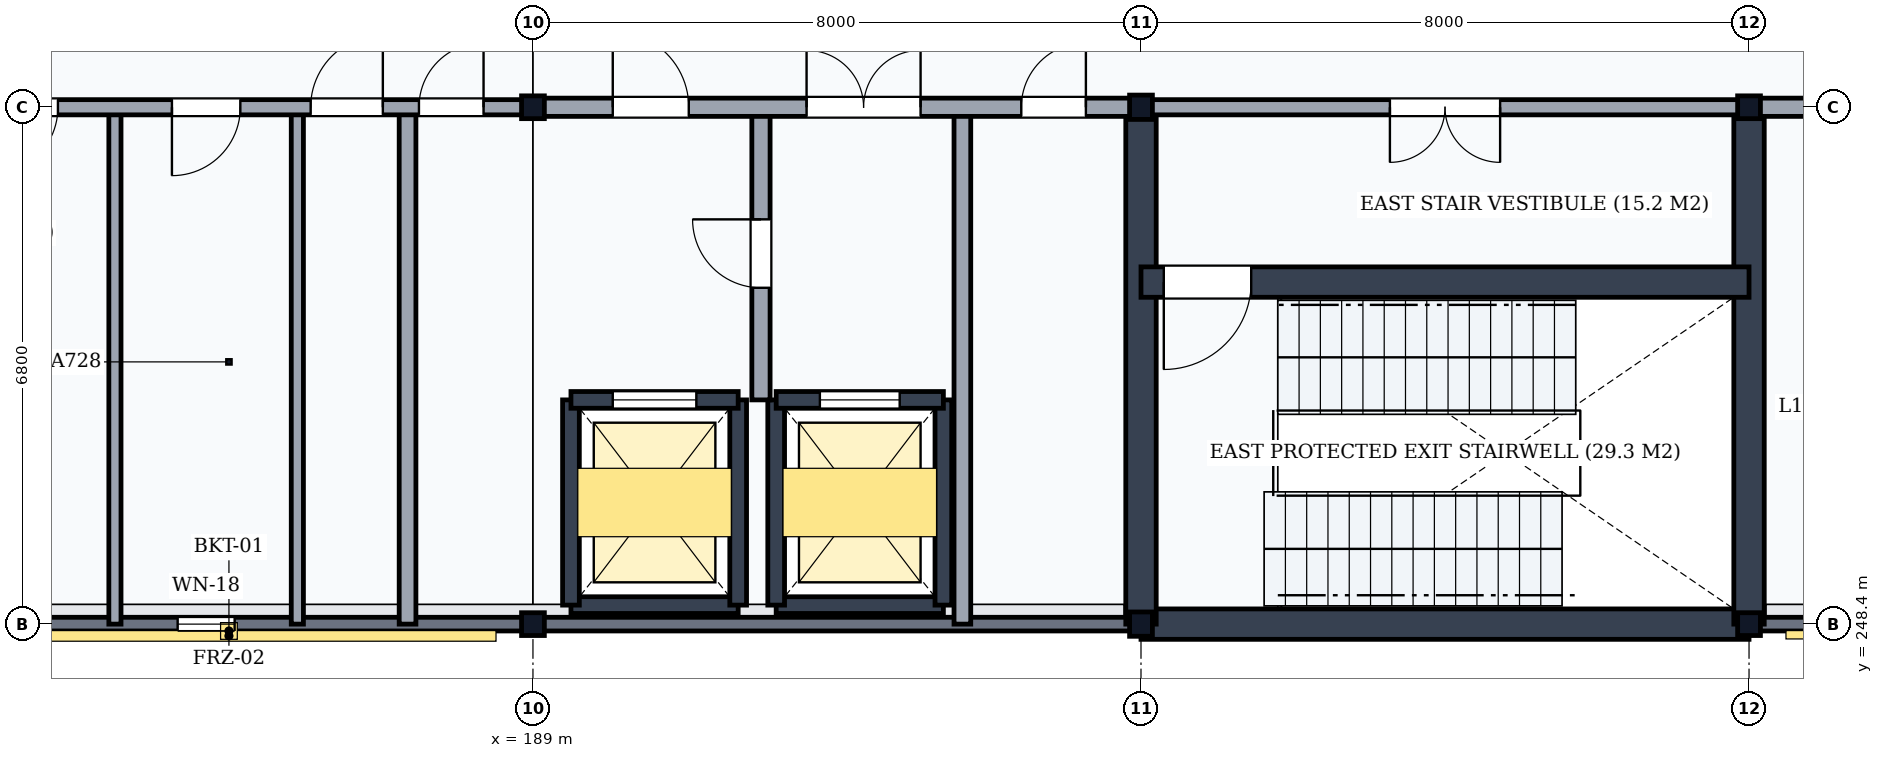
"""IFC4 building model, lengths in metres.
Left out: names, types, materials, properties, quantities, classifications, styles, units other than length and angle.
Written with IfcOpenShell. Run it as: python <this file> out.ifc"""

import sys

from ifc_helpers import new_model, si_unit, direction, frame, frame_2d, origin, origin_2d, place, context, subcontext, project, spatial, rectangle, i_section, extrude, element, fill, save


model = new_model("IFC4")
c1 = context("Model", 3, precision=1e-05, world=origin(), true_north=direction((0.0, 1.0)))
c2 = subcontext(c1, "Body", "Model", "MODEL_VIEW")
j1 = project(units=[si_unit("LENGTHUNIT", "METRE"), si_unit("PLANEANGLEUNIT", "RADIAN")], contexts=[c1])
p1 = place(None, origin())
s1 = spatial("IfcSite", under=j1, at=p1, CompositionType="ELEMENT")
p2 = place(p1, origin())
s2 = spatial("IfcBuilding", under=s1, at=p2, CompositionType="ELEMENT")
p3 = place(p2, frame((0.0, 0.0, 72.3)))
s3 = spatial("IfcBuildingStorey", under=s2, at=p3, CompositionType="ELEMENT", Elevation=72.3)
for number, where, z_axis, x_axis in (
    (1, (189.0, 248.4, 0.0), (0.0, 0.0, 1.0), (1.0, 0.0, 0.0)),
    (2, (189.0, 255.2, 0.0), (0.0, 0.0, 1.0), (1.0, 0.0, 0.0)),
):
    element("IfcColumn", number, at=place(p3, frame(where, z_axis=z_axis, x_axis=x_axis)), inside=s3, PredefinedType="COLUMN", context=c2, shape_type="SweptSolid", body=[
        extrude(i_section(OverallWidth=0.3, OverallDepth=0.3, WebThickness=0.011, FlangeThickness=0.019, FilletRadius=0.027, at=origin_2d()), origin(), (0.0, 0.0, 1.0), 5.4),
    ])
for number, where, z_axis, x_axis in (
    (3, (197.0, 248.4, 0.0), (0.0, 0.0, 1.0), (1.0, 0.0, 0.0)),
    (4, (197.0, 255.2, 0.0), (0.0, 0.0, 1.0), (1.0, 0.0, 0.0)),
):
    element("IfcColumn", number, at=place(p3, frame(where, z_axis=z_axis, x_axis=x_axis)), inside=s3, PredefinedType="COLUMN", context=c2, shape_type="SweptSolid", body=[
        extrude(i_section(OverallWidth=0.3, OverallDepth=0.32, WebThickness=0.011, FlangeThickness=0.021, FilletRadius=0.027, at=origin_2d()), origin(), (0.0, 0.0, 1.0), 5.4),
    ])
for number, where, z_axis, x_axis in (
    (5, (205.0, 248.4, 0.0), (0.0, 0.0, 1.0), (1.0, 0.0, 0.0)),
    (6, (205.0, 255.2, 0.0), (0.0, 0.0, 1.0), (1.0, 0.0, 0.0)),
):
    element("IfcColumn", number, at=place(p3, frame(where, z_axis=z_axis, x_axis=x_axis)), inside=s3, PredefinedType="COLUMN", context=c2, shape_type="SweptSolid", body=[
        extrude(i_section(OverallWidth=0.3, OverallDepth=0.3, WebThickness=0.011, FlangeThickness=0.019, FilletRadius=0.027, at=origin_2d()), origin(), (0.0, 0.0, 1.0), 5.4),
    ])
p4 = place(p3, frame((181.006, 248.4, 0.0), z_axis=(0.0, 0.0, 1.0), x_axis=(1.0, 0.0, 0.0)))
e7 = element("IfcWall", 7, at=p4, inside=s3, PredefinedType="SOLIDWALL", context=c2, shape_type="SweptSolid", body=[
    extrude(rectangle(XDim=7.988, YDim=0.18, at=frame_2d((3.994, 0.0))), origin(), (0.0, 0.0, 1.0), 4.838),
])
p5 = place(p4, frame((3.319, 0.0, 0.85)))
e8 = element("IfcOpeningElement", 8, at=p5, cuts=e7, PredefinedType="OPENING", context=c2, shape_type="SweptSolid", body=[
    extrude(rectangle(XDim=0.75, YDim=2.0, at=frame_2d((0.375, 1.0))), frame((0.0, 0.105, 0.0), z_axis=(0.0, -1.0, 0.0), x_axis=(1.0, 0.0, 0.0)), (0.0, 0.0, 1.0), 0.21),
])
p6 = place(p3, frame((189.006, 248.4, 0.0), z_axis=(0.0, 0.0, 1.0), x_axis=(1.0, 0.0, 0.0)))
e9 = element("IfcWall", 9, at=p6, inside=s3, PredefinedType="SOLIDWALL", context=c2, shape_type="SweptSolid", body=[
    extrude(rectangle(XDim=7.988, YDim=0.18, at=frame_2d((3.994, 0.0))), origin(), (0.0, 0.0, 1.0), 4.838),
])
p7 = place(p3, frame((205.006, 248.4, 0.0), z_axis=(0.0, 0.0, 1.0), x_axis=(1.0, 0.0, 0.0)))
e10 = element("IfcWall", 10, at=p7, inside=s3, PredefinedType="SOLIDWALL", context=c2, shape_type="SweptSolid", body=[
    extrude(rectangle(XDim=7.988, YDim=0.18, at=frame_2d((3.994, 0.0))), origin(), (0.0, 0.0, 1.0), 4.838),
])
p8 = place(p7, frame((3.244, 0.0, 0.95)))
e11 = element("IfcOpeningElement", 11, at=p8, cuts=e10, PredefinedType="OPENING", context=c2, shape_type="SweptSolid", body=[
    extrude(rectangle(XDim=1.5, YDim=1.9, at=frame_2d((0.75, 0.95))), frame((0.0, 0.105, 0.0), z_axis=(0.0, -1.0, 0.0), x_axis=(1.0, 0.0, 0.0)), (0.0, 0.0, 1.0), 0.21),
])
p9 = place(p3, frame((173.22, 248.53, 5.4), z_axis=(0.0, 0.0, 1.0), x_axis=(1.0, 0.0, 0.0)))
e12 = element("IfcWall", 12, at=p9, inside=s3, PredefinedType="PARAPET", context=c2, shape_type="SweptSolid", body=[
    extrude(rectangle(XDim=23.56, YDim=0.26, at=frame_2d((11.78, 0.0))), origin(), (0.0, 0.0, 1.0), 1.5),
])
p10 = place(p3, frame((205.22, 248.53, 5.4), z_axis=(0.0, 0.0, 1.0), x_axis=(1.0, 0.0, 0.0)))
e13 = element("IfcWall", 13, at=p10, inside=s3, PredefinedType="PARAPET", context=c2, shape_type="SweptSolid", body=[
    extrude(rectangle(XDim=7.78, YDim=0.26, at=frame_2d((3.89, 0.0))), origin(), (0.0, 0.0, 1.0), 1.5),
])
p11 = place(p3, frame((197.0, 248.4, 0.0), z_axis=(0.0, 0.0, 1.0), x_axis=(1.0, 0.0, 0.0)))
e14 = element("IfcWall", 14, at=p11, inside=s3, PredefinedType="SHEAR", context=c2, shape_type="SweptSolid", body=[
    extrude(rectangle(XDim=8.0, YDim=0.4, at=frame_2d((4.0, 0.0))), origin(), (0.0, 0.0, 1.0), 5.15),
])
for number, where, z_axis, x_axis in (
    (15, (197.0, 248.4, 0.0), (0.0, 0.0, 1.0), (0.0, 1.0, 0.0)),
    (16, (205.0, 248.4, 0.0), (0.0, 0.0, 1.0), (0.0, 1.0, 0.0)),
):
    element("IfcWall", number, at=place(p3, frame(where, z_axis=z_axis, x_axis=x_axis)), inside=s3, PredefinedType="SHEAR", context=c2, shape_type="SweptSolid", body=[
        extrude(rectangle(XDim=6.8, YDim=0.4, at=frame_2d((3.4, 0.0))), origin(), (0.0, 0.0, 1.0), 5.15),
    ])
p12 = place(p3, frame((197.0, 252.9, 0.0), z_axis=(0.0, 0.0, 1.0), x_axis=(1.0, 0.0, 0.0)))
e17 = element("IfcWall", 17, at=p12, inside=s3, PredefinedType="SHEAR", context=c2, shape_type="SweptSolid", body=[
    extrude(rectangle(XDim=8.0, YDim=0.4, at=frame_2d((4.0, 0.0))), origin(), (0.0, 0.0, 1.0), 5.15),
])
p13 = place(p12, frame((0.3, 0.0, 0.0)))
e18 = element("IfcOpeningElement", 18, at=p13, cuts=e17, PredefinedType="OPENING", context=c2, shape_type="SweptSolid", body=[
    extrude(rectangle(XDim=1.15, YDim=2.15, at=frame_2d((0.575, 1.075))), frame((0.0, 0.215, 0.0), z_axis=(0.0, -1.0, 0.0), x_axis=(1.0, 0.0, 0.0)), (0.0, 0.0, 1.0), 0.43),
])
p14 = place(p3, frame((197.0, 255.2, 0.0), z_axis=(0.0, 0.0, 1.0), x_axis=(1.0, 0.0, 0.0)))
e19 = element("IfcWall", 19, at=p14, inside=s3, PredefinedType="PARTITIONING", context=c2, shape_type="SweptSolid", body=[
    extrude(rectangle(XDim=8.0, YDim=0.2, at=frame_2d((4.0, 0.0))), origin(), (0.0, 0.0, 1.0), 4.648),
])
p15 = place(p14, frame((3.275, 0.0, 0.0)))
e20 = element("IfcOpeningElement", 20, at=p15, cuts=e19, PredefinedType="OPENING", context=c2, shape_type="SweptSolid", body=[
    extrude(rectangle(XDim=1.45, YDim=2.2, at=frame_2d((0.725, 1.1))), frame((0.0, 0.115, 0.0), z_axis=(0.0, -1.0, 0.0), x_axis=(1.0, 0.0, 0.0)), (0.0, 0.0, 1.0), 0.23),
])
p16 = place(p3, frame((189.5, 248.65, 0.0), z_axis=(0.0, 0.0, 1.0), x_axis=(1.0, 0.0, 0.0)))
e21 = element("IfcWall", 21, at=p16, inside=s3, PredefinedType="SHEAR", context=c2, shape_type="SweptSolid", body=[
    extrude(rectangle(XDim=2.2, YDim=0.22, at=frame_2d((1.1, 0.0))), origin(), (0.0, 0.0, 1.0), 5.15),
])
for number, where, z_axis, x_axis in (
    (22, (189.5, 248.65, 0.0), (0.0, 0.0, 1.0), (0.0, 1.0, 0.0)),
    (23, (191.7, 248.65, 0.0), (0.0, 0.0, 1.0), (0.0, 1.0, 0.0)),
):
    element("IfcWall", number, at=place(p3, frame(where, z_axis=z_axis, x_axis=x_axis)), inside=s3, PredefinedType="SHEAR", context=c2, shape_type="SweptSolid", body=[
        extrude(rectangle(XDim=2.7, YDim=0.22, at=frame_2d((1.35, 0.0))), origin(), (0.0, 0.0, 1.0), 5.15),
    ])
p17 = place(p3, frame((189.5, 251.35, 0.0), z_axis=(0.0, 0.0, 1.0), x_axis=(1.0, 0.0, 0.0)))
e24 = element("IfcWall", 24, at=p17, inside=s3, PredefinedType="SHEAR", context=c2, shape_type="SweptSolid", body=[
    extrude(rectangle(XDim=2.2, YDim=0.22, at=frame_2d((1.1, 0.0))), origin(), (0.0, 0.0, 1.0), 5.15),
])
p18 = place(p17, frame((0.55, 0.0, 0.0)))
e25 = element("IfcOpeningElement", 25, at=p18, cuts=e24, PredefinedType="OPENING", context=c2, shape_type="SweptSolid", body=[
    extrude(rectangle(XDim=1.1, YDim=2.15, at=frame_2d((0.55, 1.075))), frame((0.0, 0.125, 0.0), z_axis=(0.0, -1.0, 0.0), x_axis=(1.0, 0.0, 0.0)), (0.0, 0.0, 1.0), 0.25),
])
p19 = place(p3, frame((192.2, 248.65, 0.0), z_axis=(0.0, 0.0, 1.0), x_axis=(1.0, 0.0, 0.0)))
e26 = element("IfcWall", 26, at=p19, inside=s3, PredefinedType="SHEAR", context=c2, shape_type="SweptSolid", body=[
    extrude(rectangle(XDim=2.2, YDim=0.22, at=frame_2d((1.1, 0.0))), origin(), (0.0, 0.0, 1.0), 5.15),
])
for number, where, z_axis, x_axis in (
    (27, (192.2, 248.65, 0.0), (0.0, 0.0, 1.0), (0.0, 1.0, 0.0)),
    (28, (194.4, 248.65, 0.0), (0.0, 0.0, 1.0), (0.0, 1.0, 0.0)),
):
    element("IfcWall", number, at=place(p3, frame(where, z_axis=z_axis, x_axis=x_axis)), inside=s3, PredefinedType="SHEAR", context=c2, shape_type="SweptSolid", body=[
        extrude(rectangle(XDim=2.7, YDim=0.22, at=frame_2d((1.35, 0.0))), origin(), (0.0, 0.0, 1.0), 5.15),
    ])
p20 = place(p3, frame((192.2, 251.35, 0.0), z_axis=(0.0, 0.0, 1.0), x_axis=(1.0, 0.0, 0.0)))
e29 = element("IfcWall", 29, at=p20, inside=s3, PredefinedType="SHEAR", context=c2, shape_type="SweptSolid", body=[
    extrude(rectangle(XDim=2.2, YDim=0.22, at=frame_2d((1.1, 0.0))), origin(), (0.0, 0.0, 1.0), 5.15),
])
p21 = place(p20, frame((0.575, 0.0, 0.0)))
e30 = element("IfcOpeningElement", 30, at=p21, cuts=e29, PredefinedType="OPENING", context=c2, shape_type="SweptSolid", body=[
    extrude(rectangle(XDim=1.05, YDim=2.15, at=frame_2d((0.525, 1.075))), frame((0.0, 0.125, 0.0), z_axis=(0.0, -1.0, 0.0), x_axis=(1.0, 0.0, 0.0)), (0.0, 0.0, 1.0), 0.25),
])
p22 = place(p3, frame((192.0, 251.35, 0.0), z_axis=(0.0, 0.0, 1.0), x_axis=(0.0, 1.0, 0.0)))
e31 = element("IfcWall", 31, at=p22, inside=s3, PredefinedType="PARTITIONING", context=c2, shape_type="SweptSolid", body=[
    extrude(rectangle(XDim=3.85, YDim=0.24, at=frame_2d((1.925, 0.0))), origin(), (0.0, 0.0, 1.0), 5.15),
])
p23 = place(p22, frame((1.475, 0.0, 0.0)))
e32 = element("IfcOpeningElement", 32, at=p23, cuts=e31, PredefinedType="OPENING", context=c2, shape_type="SweptSolid", body=[
    extrude(rectangle(XDim=0.9, YDim=2.1, at=frame_2d((0.45, 1.05))), frame((0.0, 0.135, 0.0), z_axis=(0.0, -1.0, 0.0), x_axis=(1.0, 0.0, 0.0)), (0.0, 0.0, 1.0), 0.27),
])
p24 = place(p3, frame((194.65, 248.4, 0.0), z_axis=(0.0, 0.0, 1.0), x_axis=(0.0, 1.0, 0.0)))
e33 = element("IfcWall", 33, at=p24, inside=s3, PredefinedType="PARTITIONING", context=c2, shape_type="SweptSolid", body=[
    extrude(rectangle(XDim=6.8, YDim=0.22, at=frame_2d((3.4, 0.0))), origin(), (0.0, 0.0, 1.0), 5.15),
])
for number, where, z_axis, x_axis in (
    (34, (183.5, 248.4, 0.0), (0.0, 0.0, 1.0), (0.0, 1.0, 0.0)),
    (35, (185.9, 248.4, 0.0), (0.0, 0.0, 1.0), (0.0, 1.0, 0.0)),
):
    element("IfcWall", number, at=place(p3, frame(where, z_axis=z_axis, x_axis=x_axis)), inside=s3, PredefinedType="PARTITIONING", context=c2, shape_type="SweptSolid", body=[
        extrude(rectangle(XDim=6.8, YDim=0.16, at=frame_2d((3.4, 0.0))), origin(), (0.0, 0.0, 1.0), 5.15),
    ])
p25 = place(p3, frame((187.35, 248.4, 0.0), z_axis=(0.0, 0.0, 1.0), x_axis=(0.0, 1.0, 0.0)))
e36 = element("IfcWall", 36, at=p25, inside=s3, PredefinedType="PARTITIONING", context=c2, shape_type="SweptSolid", body=[
    extrude(rectangle(XDim=6.8, YDim=0.22, at=frame_2d((3.4, 0.0))), origin(), (0.0, 0.0, 1.0), 5.15),
])
p26 = place(p3, frame((181.0, 255.2, 0.0), z_axis=(0.0, 0.0, 1.0), x_axis=(1.0, 0.0, 0.0)))
e37 = element("IfcWall", 37, at=p26, inside=s3, PredefinedType="PARTITIONING", context=c2, shape_type="SweptSolid", body=[
    extrude(rectangle(XDim=8.0, YDim=0.2, at=frame_2d((4.0, 0.0))), origin(), (0.0, 0.0, 1.0), 4.648),
])
p27 = place(p26, frame((0.85, 0.0, 0.0)))
e38 = element("IfcOpeningElement", 38, at=p27, cuts=e37, PredefinedType="OPENING", context=c2, shape_type="SweptSolid", body=[
    extrude(rectangle(XDim=0.9, YDim=2.1, at=frame_2d((0.45, 1.05))), frame((0.0, 0.115, 0.0), z_axis=(0.0, -1.0, 0.0), x_axis=(1.0, 0.0, 0.0)), (0.0, 0.0, 1.0), 0.23),
])
p28 = place(p26, frame((3.25, 0.0, 0.0)))
e39 = element("IfcOpeningElement", 39, at=p28, cuts=e37, PredefinedType="OPENING", context=c2, shape_type="SweptSolid", body=[
    extrude(rectangle(XDim=0.9, YDim=2.1, at=frame_2d((0.45, 1.05))), frame((0.0, 0.115, 0.0), z_axis=(0.0, -1.0, 0.0), x_axis=(1.0, 0.0, 0.0)), (0.0, 0.0, 1.0), 0.23),
])
p29 = place(p26, frame((5.075, 0.0, 0.0)))
e40 = element("IfcOpeningElement", 40, at=p29, cuts=e37, PredefinedType="OPENING", context=c2, shape_type="SweptSolid", body=[
    extrude(rectangle(XDim=0.95, YDim=2.1, at=frame_2d((0.475, 1.05))), frame((0.0, 0.115, 0.0), z_axis=(0.0, -1.0, 0.0), x_axis=(1.0, 0.0, 0.0)), (0.0, 0.0, 1.0), 0.23),
])
p30 = place(p26, frame((6.5, 0.0, 0.0)))
e41 = element("IfcOpeningElement", 41, at=p30, cuts=e37, PredefinedType="OPENING", context=c2, shape_type="SweptSolid", body=[
    extrude(rectangle(XDim=0.85, YDim=2.1, at=frame_2d((0.425, 1.05))), frame((0.0, 0.115, 0.0), z_axis=(0.0, -1.0, 0.0), x_axis=(1.0, 0.0, 0.0)), (0.0, 0.0, 1.0), 0.23),
])
p31 = place(p3, frame((189.0, 255.2, 0.0), z_axis=(0.0, 0.0, 1.0), x_axis=(1.0, 0.0, 0.0)))
e42 = element("IfcWall", 42, at=p31, inside=s3, PredefinedType="PARTITIONING", context=c2, shape_type="SweptSolid", body=[
    extrude(rectangle(XDim=8.0, YDim=0.24, at=frame_2d((4.0, 0.0))), origin(), (0.0, 0.0, 1.0), 4.648),
])
p32 = place(p31, frame((1.05, 0.0, 0.0)))
e43 = element("IfcOpeningElement", 43, at=p32, cuts=e42, PredefinedType="OPENING", context=c2, shape_type="SweptSolid", body=[
    extrude(rectangle(XDim=1.0, YDim=2.1, at=frame_2d((0.5, 1.05))), frame((0.0, 0.135, 0.0), z_axis=(0.0, -1.0, 0.0), x_axis=(1.0, 0.0, 0.0)), (0.0, 0.0, 1.0), 0.27),
])
p33 = place(p31, frame((3.6, 0.0, 0.0)))
e44 = element("IfcOpeningElement", 44, at=p33, cuts=e42, PredefinedType="OPENING", context=c2, shape_type="SweptSolid", body=[
    extrude(rectangle(XDim=1.5, YDim=2.25, at=frame_2d((0.75, 1.125))), frame((0.0, 0.135, 0.0), z_axis=(0.0, -1.0, 0.0), x_axis=(1.0, 0.0, 0.0)), (0.0, 0.0, 1.0), 0.27),
])
p34 = place(p31, frame((6.425, 0.0, 0.0)))
e45 = element("IfcOpeningElement", 45, at=p34, cuts=e42, PredefinedType="OPENING", context=c2, shape_type="SweptSolid", body=[
    extrude(rectangle(XDim=0.85, YDim=2.1, at=frame_2d((0.425, 1.05))), frame((0.0, 0.135, 0.0), z_axis=(0.0, -1.0, 0.0), x_axis=(1.0, 0.0, 0.0)), (0.0, 0.0, 1.0), 0.27),
])
p35 = place(p3, frame((205.0, 255.2, 0.0), z_axis=(0.0, 0.0, 1.0), x_axis=(1.0, 0.0, 0.0)))
e46 = element("IfcWall", 46, at=p35, inside=s3, PredefinedType="PARTITIONING", context=c2, shape_type="SweptSolid", body=[
    extrude(rectangle(XDim=8.0, YDim=0.24, at=frame_2d((4.0, 0.0))), origin(), (0.0, 0.0, 1.0), 4.648),
])
p36 = place(p35, frame((3.45, 0.0, 0.0)))
e47 = element("IfcOpeningElement", 47, at=p36, cuts=e46, PredefinedType="OPENING", context=c2, shape_type="SweptSolid", body=[
    extrude(rectangle(XDim=1.1, YDim=2.1, at=frame_2d((0.55, 1.05))), frame((0.0, 0.135, 0.0), z_axis=(0.0, -1.0, 0.0), x_axis=(1.0, 0.0, 0.0)), (0.0, 0.0, 1.0), 0.27),
])
p37 = place(p5, origin())
e48 = element("IfcWindow", 48, at=p37, inside=s3, PartitioningType="SINGLE_PANEL", PredefinedType="WINDOW", context=c2, shape_type="SweptSolid", body=[
    extrude(rectangle(XDim=0.75, YDim=2.0, at=frame_2d((0.375, 1.0))), frame((0.0, 0.03, 0.0), z_axis=(0.0, -1.0, 0.0), x_axis=(1.0, 0.0, 0.0)), (0.0, 0.0, 1.0), 0.06),
])
fill(e8, e48)
p38 = place(p13, frame((1.15, 0.0, 0.0), z_axis=(0.0, 0.0, 1.0), x_axis=(-1.0, 0.0, 0.0)))
e49 = element("IfcDoor", 49, at=p38, inside=s3, OperationType="SINGLE_SWING_RIGHT", PredefinedType="DOOR", context=c2, shape_type="SweptSolid", body=[
    extrude(rectangle(XDim=1.15, YDim=2.15, at=frame_2d((0.575, 1.075))), frame((0.0, 0.025, 0.0), z_axis=(0.0, -1.0, 0.0), x_axis=(1.0, 0.0, 0.0)), (0.0, 0.0, 1.0), 0.05),
])
fill(e18, e49)
p39 = place(p15, frame((1.45, 0.0, 0.0), z_axis=(0.0, 0.0, 1.0), x_axis=(-1.0, 0.0, 0.0)))
e50 = element("IfcDoor", 50, at=p39, inside=s3, OperationType="DOUBLE_DOOR_SINGLE_SWING", PredefinedType="DOOR", context=c2, shape_type="SweptSolid", body=[
    extrude(rectangle(XDim=1.45, YDim=2.2, at=frame_2d((0.725, 1.1))), frame((0.0, 0.025, 0.0), z_axis=(0.0, -1.0, 0.0), x_axis=(1.0, 0.0, 0.0)), (0.0, 0.0, 1.0), 0.05),
])
fill(e20, e50)
p40 = place(p18, origin())
e51 = element("IfcDoor", 51, at=p40, inside=s3, OperationType="DOUBLE_DOOR_SLIDING", PredefinedType="USERDEFINED", context=c2, shape_type="SweptSolid", body=[
    extrude(rectangle(XDim=1.1, YDim=2.15, at=frame_2d((0.55, 1.075))), frame((0.0, 0.025, 0.0), z_axis=(0.0, -1.0, 0.0), x_axis=(1.0, 0.0, 0.0)), (0.0, 0.0, 1.0), 0.05),
])
fill(e25, e51)
p41 = place(p21, origin())
e52 = element("IfcDoor", 52, at=p41, inside=s3, OperationType="DOUBLE_DOOR_SLIDING", PredefinedType="USERDEFINED", context=c2, shape_type="SweptSolid", body=[
    extrude(rectangle(XDim=1.05, YDim=2.15, at=frame_2d((0.525, 1.075))), frame((0.0, 0.025, 0.0), z_axis=(0.0, -1.0, 0.0), x_axis=(1.0, 0.0, 0.0)), (0.0, 0.0, 1.0), 0.05),
])
fill(e30, e52)
p42 = place(p23, frame((0.9, 0.0, 0.0), z_axis=(0.0, 0.0, 1.0), x_axis=(-1.0, 0.0, 0.0)))
e53 = element("IfcDoor", 53, at=p42, inside=s3, OperationType="SINGLE_SWING_LEFT", PredefinedType="DOOR", context=c2, shape_type="SweptSolid", body=[
    extrude(rectangle(XDim=0.9, YDim=2.1, at=frame_2d((0.45, 1.05))), frame((0.0, 0.025, 0.0), z_axis=(0.0, -1.0, 0.0), x_axis=(1.0, 0.0, 0.0)), (0.0, 0.0, 1.0), 0.05),
])
fill(e32, e53)
p43 = place(p27, frame((0.9, 0.0, 0.0), z_axis=(0.0, 0.0, 1.0), x_axis=(-1.0, 0.0, 0.0)))
e54 = element("IfcDoor", 54, at=p43, inside=s3, OperationType="SINGLE_SWING_RIGHT", PredefinedType="DOOR", context=c2, shape_type="SweptSolid", body=[
    extrude(rectangle(XDim=0.9, YDim=2.1, at=frame_2d((0.45, 1.05))), frame((0.0, 0.025, 0.0), z_axis=(0.0, -1.0, 0.0), x_axis=(1.0, 0.0, 0.0)), (0.0, 0.0, 1.0), 0.05),
])
fill(e38, e54)
p44 = place(p28, frame((0.9, 0.0, 0.0), z_axis=(0.0, 0.0, 1.0), x_axis=(-1.0, 0.0, 0.0)))
e55 = element("IfcDoor", 55, at=p44, inside=s3, OperationType="SINGLE_SWING_RIGHT", PredefinedType="DOOR", context=c2, shape_type="SweptSolid", body=[
    extrude(rectangle(XDim=0.9, YDim=2.1, at=frame_2d((0.45, 1.05))), frame((0.0, 0.025, 0.0), z_axis=(0.0, -1.0, 0.0), x_axis=(1.0, 0.0, 0.0)), (0.0, 0.0, 1.0), 0.05),
])
fill(e39, e55)
p45 = place(p29, frame((0.95, 0.0, 0.0), z_axis=(0.0, 0.0, 1.0), x_axis=(-1.0, 0.0, 0.0)))
e56 = element("IfcDoor", 56, at=p45, inside=s3, OperationType="SINGLE_SWING_LEFT", PredefinedType="DOOR", context=c2, shape_type="SweptSolid", body=[
    extrude(rectangle(XDim=0.95, YDim=2.1, at=frame_2d((0.475, 1.05))), frame((0.0, 0.025, 0.0), z_axis=(0.0, -1.0, 0.0), x_axis=(1.0, 0.0, 0.0)), (0.0, 0.0, 1.0), 0.05),
])
fill(e40, e56)
p46 = place(p30, frame((0.85, 0.0, 0.0), z_axis=(0.0, 0.0, 1.0), x_axis=(-1.0, 0.0, 0.0)))
e57 = element("IfcDoor", 57, at=p46, inside=s3, OperationType="SINGLE_SWING_LEFT", PredefinedType="DOOR", context=c2, shape_type="SweptSolid", body=[
    extrude(rectangle(XDim=0.85, YDim=2.1, at=frame_2d((0.425, 1.05))), frame((0.0, 0.025, 0.0), z_axis=(0.0, -1.0, 0.0), x_axis=(1.0, 0.0, 0.0)), (0.0, 0.0, 1.0), 0.05),
])
fill(e41, e57)
p47 = place(p32, origin())
e58 = element("IfcDoor", 58, at=p47, inside=s3, OperationType="SINGLE_SWING_LEFT", PredefinedType="DOOR", context=c2, shape_type="SweptSolid", body=[
    extrude(rectangle(XDim=1.0, YDim=2.1, at=frame_2d((0.5, 1.05))), frame((0.0, 0.025, 0.0), z_axis=(0.0, -1.0, 0.0), x_axis=(1.0, 0.0, 0.0)), (0.0, 0.0, 1.0), 0.05),
])
fill(e43, e58)
p48 = place(p33, origin())
e59 = element("IfcDoor", 59, at=p48, inside=s3, OperationType="DOUBLE_DOOR_SINGLE_SWING", PredefinedType="DOOR", context=c2, shape_type="SweptSolid", body=[
    extrude(rectangle(XDim=1.5, YDim=2.25, at=frame_2d((0.75, 1.125))), frame((0.0, 0.025, 0.0), z_axis=(0.0, -1.0, 0.0), x_axis=(1.0, 0.0, 0.0)), (0.0, 0.0, 1.0), 0.05),
])
fill(e44, e59)
p49 = place(p34, frame((0.85, 0.0, 0.0), z_axis=(0.0, 0.0, 1.0), x_axis=(-1.0, 0.0, 0.0)))
e60 = element("IfcDoor", 60, at=p49, inside=s3, OperationType="SINGLE_SWING_LEFT", PredefinedType="DOOR", context=c2, shape_type="SweptSolid", body=[
    extrude(rectangle(XDim=0.85, YDim=2.1, at=frame_2d((0.425, 1.05))), frame((0.0, 0.025, 0.0), z_axis=(0.0, -1.0, 0.0), x_axis=(1.0, 0.0, 0.0)), (0.0, 0.0, 1.0), 0.05),
])
fill(e45, e60)
save(model, sys.argv[1])
